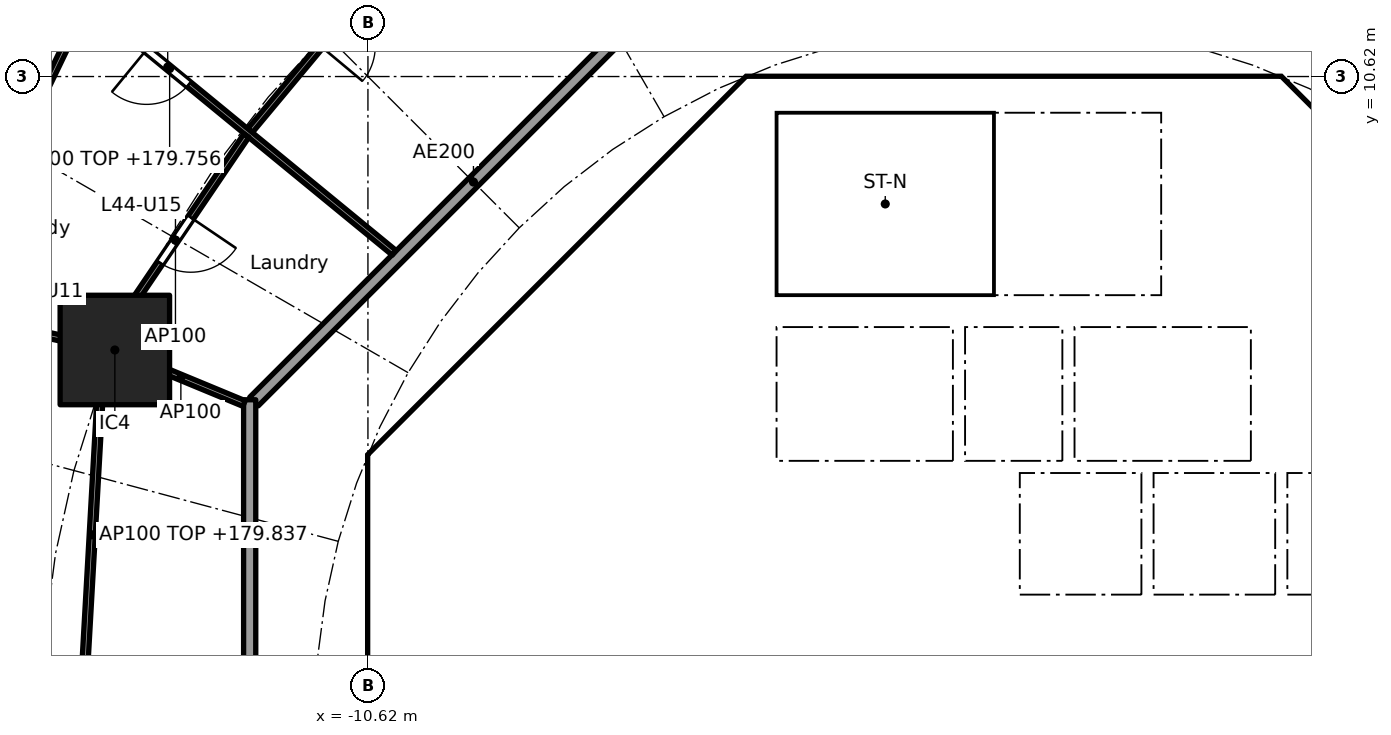
"""IFC4 building model, lengths in metres.
Left out: names, types, materials, properties, quantities, classifications, styles, units other than length and angle.
Written with IfcOpenShell. Run it as: python <this file> out.ifc"""

import sys

from ifc_helpers import new_model, si_unit, direction, frame, frame_2d, origin, origin_2d, place, context, subcontext, project, spatial, polyline, rectangle, outline, extrude, element, fill, save


model = new_model("IFC4")
c1 = context("Model", 3, precision=1e-05, world=origin(), true_north=direction((0.0, 1.0)))
c2 = subcontext(c1, "Body", "Model", "MODEL_VIEW")
j1 = project(units=[si_unit("LENGTHUNIT", "METRE"), si_unit("PLANEANGLEUNIT", "RADIAN")], contexts=[c1])
p1 = place(None, origin())
s1 = spatial("IfcSite", under=j1, at=p1, CompositionType="ELEMENT")
p2 = place(p1, origin())
s2 = spatial("IfcBuilding", under=s1, at=p2, CompositionType="ELEMENT")
p3 = place(p2, frame((0.0, 0.0, 177.0)))
s3 = spatial("IfcBuildingStorey", under=s2, at=p3, CompositionType="ELEMENT", Elevation=177.0)
p4 = place(p3, frame((-14.782, 6.123, 0.0), z_axis=(0.0, 0.0, 1.0), x_axis=(1.0, 0.0, 0.0)))
e1 = element("IfcColumn", 1, at=p4, inside=s3, PredefinedType="COLUMN", context=c2, shape_type="SweptSolid", body=[
    extrude(rectangle(XDim=1.8, YDim=1.8, at=origin_2d()), origin(), (0.0, 0.0, 1.0), 3.7),
])
p5 = place(p3, frame((9.988, 4.613, 0.0), z_axis=(0.0, 0.0, 1.0), x_axis=(-0.707106781187, 0.707106781187, 0.0)))
e2 = element("IfcWall", 2, at=p5, inside=s3, PredefinedType="SHEAR", context=c2, shape_type="SweptSolid", body=[
    extrude(rectangle(XDim=7.602, YDim=0.6, at=frame_2d((3.801, 0.0))), origin(), (0.0, 0.0, 1.0), 3.44),
])
p6 = place(p5, frame((3.201, 0.0, 0.0)))
e3 = element("IfcOpeningElement", 3, at=p6, cuts=e2, PredefinedType="OPENING", context=c2, shape_type="SweptSolid", body=[
    extrude(rectangle(XDim=1.2, YDim=2.1, at=frame_2d((0.6, 1.05))), frame((0.0, 0.31, 0.0), z_axis=(0.0, -1.0, 0.0), x_axis=(1.0, 0.0, 0.0)), (0.0, 0.0, 1.0), 0.62),
])
p7 = place(p3, frame((-4.613, 9.988, 0.0), z_axis=(0.0, 0.0, 1.0), x_axis=(-0.707106781187, -0.707106781187, 0.0)))
e4 = element("IfcWall", 4, at=p7, inside=s3, PredefinedType="SHEAR", context=c2, shape_type="SweptSolid", body=[
    extrude(rectangle(XDim=7.602, YDim=0.6, at=frame_2d((3.801, 0.0))), origin(), (0.0, 0.0, 1.0), 3.44),
])
p8 = place(p7, frame((0.351, 0.0, 0.0)))
e5 = element("IfcOpeningElement", 5, at=p8, cuts=e4, PredefinedType="OPENING", context=c2, shape_type="SweptSolid", body=[
    extrude(rectangle(XDim=1.1, YDim=2.1, at=frame_2d((0.55, 1.05))), frame((0.0, 0.31, 0.0), z_axis=(0.0, -1.0, 0.0), x_axis=(1.0, 0.0, 0.0)), (0.0, 0.0, 1.0), 0.62),
])
p9 = place(p3, frame((-10.325, 3.801, 0.0), z_axis=(0.0, 0.0, 1.0), x_axis=(0.0, -1.0, 0.0)))
e6 = element("IfcWall", 6, at=p9, inside=s3, PredefinedType="SHEAR", context=c2, shape_type="SweptSolid", body=[
    extrude(rectangle(XDim=7.602, YDim=0.6, at=frame_2d((3.801, 0.0))), origin(), (0.0, 0.0, 1.0), 3.44),
])
p10 = place(p9, frame((0.651, 0.0, 0.0)))
e7 = element("IfcOpeningElement", 7, at=p10, cuts=e6, PredefinedType="OPENING", context=c2, shape_type="SweptSolid", body=[
    extrude(rectangle(XDim=1.5, YDim=2.1, at=frame_2d((0.75, 1.05))), frame((0.0, 0.31, 0.0), z_axis=(0.0, -1.0, 0.0), x_axis=(1.0, 0.0, 0.0)), (0.0, 0.0, 1.0), 0.62),
])
p11 = place(p9, frame((5.451, 0.0, 0.0)))
e8 = element("IfcOpeningElement", 8, at=p11, cuts=e6, PredefinedType="OPENING", context=c2, shape_type="SweptSolid", body=[
    extrude(rectangle(XDim=1.5, YDim=2.1, at=frame_2d((0.75, 1.05))), frame((0.0, 0.31, 0.0), z_axis=(0.0, -1.0, 0.0), x_axis=(1.0, 0.0, 0.0)), (0.0, 0.0, 1.0), 0.62),
])
p12 = place(p3, frame((-5.8, 4.3, 0.0), z_axis=(0.0, 0.0, 1.0), x_axis=(0.0, 1.0, 0.0)))
e9 = element("IfcWall", 9, at=p12, inside=s3, PredefinedType="PARTITIONING", context=c2, shape_type="SweptSolid", body=[
    extrude(rectangle(XDim=3.927, YDim=0.15, at=frame_2d((1.963, 0.0))), origin(), (0.0, 0.0, 1.0), 3.44),
])
p13 = place(p12, frame((0.413, 0.0, 0.0)))
e10 = element("IfcOpeningElement", 10, at=p13, cuts=e9, PredefinedType="OPENING", context=c2, shape_type="SweptSolid", body=[
    extrude(rectangle(XDim=0.9, YDim=2.1, at=frame_2d((0.45, 1.05))), frame((0.0, 0.085, 0.0), z_axis=(0.0, -1.0, 0.0), x_axis=(1.0, 0.0, 0.0)), (0.0, 0.0, 1.0), 0.17),
])
p14 = place(p12, frame((2.489, 0.0, 0.0)))
e11 = element("IfcOpeningElement", 11, at=p14, cuts=e9, PredefinedType="OPENING", context=c2, shape_type="SweptSolid", body=[
    extrude(rectangle(XDim=0.9, YDim=2.1, at=frame_2d((0.45, 1.05))), frame((0.0, 0.085, 0.0), z_axis=(0.0, -1.0, 0.0), x_axis=(1.0, 0.0, 0.0)), (0.0, 0.0, 1.0), 0.17),
])
p15 = place(p3, frame((4.0, 4.3, 0.0), z_axis=(0.0, 0.0, 1.0), x_axis=(0.0, 1.0, 0.0)))
e12 = element("IfcWall", 12, at=p15, inside=s3, PredefinedType="SOLIDWALL", context=c2, shape_type="SweptSolid", body=[
    extrude(rectangle(XDim=2.2, YDim=0.2, at=frame_2d((1.1, 0.0))), origin(), (0.0, 0.0, 1.0), 3.44),
])
p16 = place(p15, frame((0.55, 0.0, 0.0)))
e13 = element("IfcOpeningElement", 13, at=p16, cuts=e12, PredefinedType="OPENING", context=c2, shape_type="SweptSolid", body=[
    extrude(rectangle(XDim=1.1, YDim=2.1, at=frame_2d((0.55, 1.05))), frame((0.0, 0.11, 0.0), z_axis=(0.0, -1.0, 0.0), x_axis=(1.0, 0.0, 0.0)), (0.0, 0.0, 1.0), 0.22),
])
p17 = place(p3, frame((-4.0, 4.3, 0.0), z_axis=(0.0, 0.0, 1.0), x_axis=(0.0, 1.0, 0.0)))
e14 = element("IfcWall", 14, at=p17, inside=s3, PredefinedType="SOLIDWALL", context=c2, shape_type="SweptSolid", body=[
    extrude(rectangle(XDim=2.2, YDim=0.2, at=frame_2d((1.1, 0.0))), origin(), (0.0, 0.0, 1.0), 3.44),
])
p18 = place(p17, frame((0.55, 0.0, 0.0)))
e15 = element("IfcOpeningElement", 15, at=p18, cuts=e14, PredefinedType="OPENING", context=c2, shape_type="SweptSolid", body=[
    extrude(rectangle(XDim=1.1, YDim=2.1, at=frame_2d((0.55, 1.05))), frame((0.0, 0.11, 0.0), z_axis=(0.0, -1.0, 0.0), x_axis=(1.0, 0.0, 0.0)), (0.0, 0.0, 1.0), 0.22),
])
p19 = place(p3, frame((-6.7, 2.0, 0.0), z_axis=(0.0, 0.0, 1.0), x_axis=(1.0, 0.0, 0.0)))
e16 = element("IfcWall", 16, at=p19, inside=s3, PredefinedType="SOLIDWALL", context=c2, shape_type="SweptSolid", body=[
    extrude(rectangle(XDim=13.4, YDim=0.2, at=frame_2d((6.7, 0.0))), origin(), (0.0, 0.0, 1.0), 3.44),
])
p20 = place(p19, frame((7.25, 0.0, 0.0)))
e17 = element("IfcOpeningElement", 17, at=p20, cuts=e16, PredefinedType="OPENING", context=c2, shape_type="SweptSolid", body=[
    extrude(rectangle(XDim=1.1, YDim=2.1, at=frame_2d((0.55, 1.05))), frame((0.0, 0.11, 0.0), z_axis=(0.0, -1.0, 0.0), x_axis=(1.0, 0.0, 0.0)), (0.0, 0.0, 1.0), 0.22),
])
p21 = place(p19, frame((9.45, 0.0, 0.0)))
e18 = element("IfcOpeningElement", 18, at=p21, cuts=e16, PredefinedType="OPENING", context=c2, shape_type="SweptSolid", body=[
    extrude(rectangle(XDim=1.1, YDim=2.1, at=frame_2d((0.55, 1.05))), frame((0.0, 0.11, 0.0), z_axis=(0.0, -1.0, 0.0), x_axis=(1.0, 0.0, 0.0)), (0.0, 0.0, 1.0), 0.22),
])
p22 = place(p19, frame((0.75, 0.0, 0.0)))
e19 = element("IfcOpeningElement", 19, at=p22, cuts=e16, PredefinedType="OPENING", context=c2, shape_type="SweptSolid", body=[
    extrude(rectangle(XDim=0.9, YDim=2.1, at=frame_2d((0.45, 1.05))), frame((0.0, 0.11, 0.0), z_axis=(0.0, -1.0, 0.0), x_axis=(1.0, 0.0, 0.0)), (0.0, 0.0, 1.0), 0.22),
])
p23 = place(p19, frame((4.05, 0.0, 0.0)))
e20 = element("IfcOpeningElement", 20, at=p23, cuts=e16, PredefinedType="OPENING", context=c2, shape_type="SweptSolid", body=[
    extrude(rectangle(XDim=0.9, YDim=2.1, at=frame_2d((0.45, 1.05))), frame((0.0, 0.11, 0.0), z_axis=(0.0, -1.0, 0.0), x_axis=(1.0, 0.0, 0.0)), (0.0, 0.0, 1.0), 0.22),
])
p24 = place(p3, frame((4.0, 7.025, 0.0), z_axis=(0.0, 0.0, 1.0), x_axis=(0.0, 1.0, 0.0)))
e21 = element("IfcWall", 21, at=p24, inside=s3, PredefinedType="SOLIDWALL", context=c2, shape_type="SweptSolid", body=[
    extrude(rectangle(XDim=3.0, YDim=0.2, at=frame_2d((1.5, 0.0))), origin(), (0.0, 0.0, 1.0), 3.44),
])
p25 = place(p24, frame((0.925, 0.0, 0.0)))
e22 = element("IfcOpeningElement", 22, at=p25, cuts=e21, PredefinedType="OPENING", context=c2, shape_type="SweptSolid", body=[
    extrude(rectangle(XDim=1.1, YDim=2.1, at=frame_2d((0.55, 1.05))), frame((0.0, 0.11, 0.0), z_axis=(0.0, -1.0, 0.0), x_axis=(1.0, 0.0, 0.0)), (0.0, 0.0, 1.0), 0.22),
])
p26 = place(p3, origin())
e23 = element("IfcWall", 23, at=p26, inside=s3, PredefinedType="SHEAR", context=c2, shape_type="SweptSolid", body=[
    extrude(outline(polyline([(-10.2, 4.825), (-9.776, 4.401), (-10.025, 4.152), (-10.025, 3.801), (-10.625, 3.801), (-10.625, 4.401), (-10.2, 4.825)])), origin(), (0.0, 0.0, 1.0), 3.44),
])
p27 = place(p3, origin())
e24 = element("IfcWall", 24, at=p27, inside=s3, PredefinedType="SHEAR", context=c2, shape_type="SweptSolid", body=[
    extrude(outline(polyline([(-4.152, 10.025), (-4.401, 9.776), (-4.825, 10.2), (-4.401, 10.625), (4.401, 10.625), (4.825, 10.2), (4.401, 9.776), (4.152, 10.025), (-4.152, 10.025)])), origin(), (0.0, 0.0, 1.0), 3.44),
])
p28 = place(p3, frame((-10.025, 4.0, 0.0), z_axis=(0.0, 0.0, 1.0), x_axis=(1.0, 0.0, 0.0)))
e25 = element("IfcWall", 25, at=p28, inside=s3, PredefinedType="PARTITIONING", context=c2, shape_type="SweptSolid", body=[
    extrude(rectangle(XDim=3.325, YDim=0.2, at=frame_2d((1.662, 0.0))), origin(), (0.0, 0.0, 1.0), 3.44),
])
p29 = place(p3, frame((-8.001, 6.1, 0.0), z_axis=(0.0, 0.0, 1.0), x_axis=(1.0, 0.0, 0.0)))
e26 = element("IfcWall", 26, at=p29, inside=s3, PredefinedType="PARTITIONING", context=c2, shape_type="SweptSolid", body=[
    extrude(rectangle(XDim=2.126, YDim=0.15, at=frame_2d((1.063, 0.0))), origin(), (0.0, 0.0, 1.0), 3.44),
])
for number, where, z_axis, x_axis in (
    (27, (-0.9, 4.3, 0.0), (0.0, 0.0, 1.0), (0.0, 1.0, 0.0)),
    (28, (0.9, 4.3, 0.0), (0.0, 0.0, 1.0), (0.0, 1.0, 0.0)),
):
    element("IfcWall", number, at=place(p3, frame(where, z_axis=z_axis, x_axis=x_axis)), inside=s3, PredefinedType="SOLIDWALL", context=c2, shape_type="SweptSolid", body=[
        extrude(rectangle(XDim=2.2, YDim=0.2, at=frame_2d((1.1, 0.0))), origin(), (0.0, 0.0, 1.0), 3.44),
    ])
p30 = place(p3, origin())
e29 = element("IfcWall", 29, at=p30, inside=s3, PredefinedType="SOLIDWALL", context=c2, shape_type="SweptSolid", body=[
    extrude(outline(polyline([(-6.7, 4.3), (6.7, 4.3), (6.7, 2.1), (6.5, 2.1), (6.5, 4.1), (4.5, 4.1), (4.5, 2.1), (4.3, 2.1), (4.3, 4.1), (2.3, 4.1), (2.3, 2.1), (2.1, 2.1), (2.1, 4.1), (0.1, 4.1), (0.1, 2.1), (-0.1, 2.1), (-0.1, 4.1), (-4.3, 4.1), (-4.3, 2.1), (-4.5, 2.1), (-4.5, 4.1), (-6.5, 4.1), (-6.5, 2.1), (-6.7, 2.1), (-6.7, 4.3)])), origin(), (0.0, 0.0, 1.0), 3.44),
])
p31 = place(p3, origin())
e30 = element("IfcWall", 30, at=p31, inside=s3, PredefinedType="SOLIDWALL", context=c2, shape_type="SweptSolid", body=[
    extrude(outline(polyline([(-3.9, 7.025), (-4.1, 7.025), (-4.1, 10.025), (-3.9, 10.025), (-3.9, 7.025)])), origin(), (0.0, 0.0, 1.0), 3.44),
])
p32 = place(p3, origin())
e31 = element("IfcWall", 31, at=p32, inside=s3, PredefinedType="SOLIDWALL", context=c2, shape_type="SweptSolid", body=[
    extrude(outline(polyline([(4.1, 6.5), (-4.1, 6.5), (-4.1, 7.025), (4.1, 7.025), (4.1, 6.5)])), origin(), (0.0, 0.0, 1.0), 3.44),
])
p33 = place(p3, frame((-5.275, 12.494, 0.0), z_axis=(0.0, 0.0, 1.0), x_axis=(-0.707106781187, -0.707106781187, 0.0)))
e32 = element("IfcWall", 32, at=p33, inside=s3, PredefinedType="PARTITIONING", context=c2, shape_type="SweptSolid", body=[
    extrude(rectangle(XDim=10.209, YDim=0.2, at=frame_2d((5.104, 0.0))), origin(), (0.0, 0.0, 1.0), 3.44),
])
p34 = place(p3, frame((-12.565, 5.304, 0.0), z_axis=(0.0, 0.0, 1.0), x_axis=(0.0, -1.0, 0.0)))
e33 = element("IfcWall", 33, at=p34, inside=s3, PredefinedType="PARTITIONING", context=c2, shape_type="SweptSolid", body=[
    extrude(rectangle(XDim=10.409, YDim=0.2, at=frame_2d((5.205, 0.0))), origin(), (0.0, 0.0, 1.0), 3.44),
])
p35 = place(p3, frame((-9.631, 13.242, 0.0), z_axis=(0.0, 0.0, 1.0), x_axis=(-0.640315711982, -0.768111833647, 0.0)))
e34 = element("IfcWall", 34, at=p35, inside=s3, PredefinedType="PARTITIONING", context=c2, shape_type="SweptSolid", body=[
    extrude(rectangle(XDim=4.572, YDim=0.1, at=frame_2d((2.286, 0.0))), origin(), (0.0, 0.0, 1.0), 2.837),
])
p36 = place(p35, frame((1.861, 0.0, 0.0)))
e35 = element("IfcOpeningElement", 35, at=p36, cuts=e34, PredefinedType="OPENING", context=c2, shape_type="SweptSolid", body=[
    extrude(rectangle(XDim=0.9, YDim=2.1, at=frame_2d((0.45, 1.05))), frame((0.0, 0.06, 0.0), z_axis=(0.0, -1.0, 0.0), x_axis=(1.0, 0.0, 0.0)), (0.0, 0.0, 1.0), 0.12),
])
p37 = place(p3, frame((-10.189, 7.721, 0.0), z_axis=(0.0, 0.0, 1.0), x_axis=(-0.773134429339, 0.634242188892, 0.0)))
e36 = element("IfcWall", 36, at=p37, inside=s3, PredefinedType="PARTITIONING", context=c2, shape_type="SweptSolid", body=[
    extrude(rectangle(XDim=9.552, YDim=0.1, at=frame_2d((4.776, 0.0))), origin(), (0.0, 0.0, 1.0), 2.756),
])
p38 = place(p37, frame((4.367, 0.0, 0.0)))
e37 = element("IfcOpeningElement", 37, at=p38, cuts=e36, PredefinedType="OPENING", context=c2, shape_type="SweptSolid", body=[
    extrude(rectangle(XDim=0.9, YDim=2.1, at=frame_2d((0.45, 1.05))), frame((0.0, 0.06, 0.0), z_axis=(0.0, -1.0, 0.0), x_axis=(1.0, 0.0, 0.0)), (0.0, 0.0, 1.0), 0.12),
])
p39 = place(p3, frame((-12.619, 9.65, 0.0), z_axis=(0.0, 0.0, 1.0), x_axis=(-0.561064907171, -0.827771810308, 0.0)))
e38 = element("IfcWall", 38, at=p39, inside=s3, PredefinedType="PARTITIONING", context=c2, shape_type="SweptSolid", body=[
    extrude(rectangle(XDim=4.159, YDim=0.1, at=frame_2d((2.079, 0.0))), origin(), (0.0, 0.0, 1.0), 3.44),
])
p40 = place(p39, frame((1.629, 0.0, 0.0)))
e39 = element("IfcOpeningElement", 39, at=p40, cuts=e38, PredefinedType="OPENING", context=c2, shape_type="SweptSolid", body=[
    extrude(rectangle(XDim=0.9, YDim=2.1, at=frame_2d((0.45, 1.05))), frame((0.0, 0.06, 0.0), z_axis=(0.0, -1.0, 0.0), x_axis=(1.0, 0.0, 0.0)), (0.0, 0.0, 1.0), 0.12),
])
p41 = place(p3, frame((-15.257, 11.816, 0.0), z_axis=(0.0, 0.0, 1.0), x_axis=(-0.434040130629, -0.900893536997, 0.0)))
e40 = element("IfcWall", 40, at=p41, inside=s3, PredefinedType="PARTITIONING", context=c2, shape_type="SweptSolid", body=[
    extrude(rectangle(XDim=5.558, YDim=0.1, at=frame_2d((2.779, 0.0))), origin(), (0.0, 0.0, 1.0), 3.44),
])
p42 = place(p3, frame((-12.657, 5.243, 0.0), z_axis=(0.0, 0.0, 1.0), x_axis=(-0.923848837015, 0.382757529444, 0.0)))
e41 = element("IfcWall", 41, at=p42, inside=s3, PredefinedType="PARTITIONING", context=c2, shape_type="SweptSolid", body=[
    extrude(rectangle(XDim=2.25, YDim=0.1, at=frame_2d((1.125, 0.0))), origin(), (0.0, 0.0, 1.0), 3.44),
])
p43 = place(p3, frame((-14.831, 6.134, 0.0), z_axis=(0.0, 0.0, 1.0), x_axis=(-0.976560749847, 0.215241961191, 0.0)))
e42 = element("IfcWall", 42, at=p43, inside=s3, PredefinedType="PARTITIONING", context=c2, shape_type="SweptSolid", body=[
    extrude(rectangle(XDim=2.879, YDim=0.1, at=frame_2d((1.439, 0.0))), origin(), (0.0, 0.0, 1.0), 3.44),
])
p44 = place(p43, frame((1.291, 0.0, 0.0)))
e43 = element("IfcOpeningElement", 43, at=p44, cuts=e42, PredefinedType="OPENING", context=c2, shape_type="SweptSolid", body=[
    extrude(rectangle(XDim=0.9, YDim=2.1, at=frame_2d((0.45, 1.05))), frame((0.0, 0.06, 0.0), z_axis=(0.0, -1.0, 0.0), x_axis=(1.0, 0.0, 0.0)), (0.0, 0.0, 1.0), 0.12),
])
p45 = place(p3, frame((-14.983, 6.117, 0.0), z_axis=(0.0, 0.0, 1.0), x_axis=(-0.056328933432, -0.998412265178, 0.0)))
e44 = element("IfcWall", 44, at=p45, inside=s3, PredefinedType="PARTITIONING", context=c2, shape_type="SweptSolid", body=[
    extrude(rectangle(XDim=6.077, YDim=0.1, at=frame_2d((3.038, 0.0))), origin(), (0.0, 0.0, 1.0), 2.837),
])
p46 = place(p20, origin())
e45 = element("IfcDoor", 45, at=p46, inside=s3, OperationType="DOUBLE_DOOR_SLIDING", PredefinedType="DOOR", context=c2, shape_type="SweptSolid", body=[
    extrude(rectangle(XDim=1.1, YDim=2.1, at=frame_2d((0.55, 1.05))), frame((0.0, 0.025, 0.0), z_axis=(0.0, -1.0, 0.0), x_axis=(1.0, 0.0, 0.0)), (0.0, 0.0, 1.0), 0.05),
])
fill(e17, e45)
p47 = place(p21, origin())
e46 = element("IfcDoor", 46, at=p47, inside=s3, OperationType="DOUBLE_DOOR_SLIDING", PredefinedType="DOOR", context=c2, shape_type="SweptSolid", body=[
    extrude(rectangle(XDim=1.1, YDim=2.1, at=frame_2d((0.55, 1.05))), frame((0.0, 0.025, 0.0), z_axis=(0.0, -1.0, 0.0), x_axis=(1.0, 0.0, 0.0)), (0.0, 0.0, 1.0), 0.05),
])
fill(e18, e46)
p48 = place(p16, origin())
e47 = element("IfcDoor", 47, at=p48, inside=s3, OperationType="DOUBLE_DOOR_SLIDING", PredefinedType="DOOR", context=c2, shape_type="SweptSolid", body=[
    extrude(rectangle(XDim=1.1, YDim=2.1, at=frame_2d((0.55, 1.05))), frame((0.0, 0.025, 0.0), z_axis=(0.0, -1.0, 0.0), x_axis=(1.0, 0.0, 0.0)), (0.0, 0.0, 1.0), 0.05),
])
fill(e13, e47)
p49 = place(p18, origin())
e48 = element("IfcDoor", 48, at=p49, inside=s3, OperationType="DOUBLE_DOOR_SLIDING", PredefinedType="DOOR", context=c2, shape_type="SweptSolid", body=[
    extrude(rectangle(XDim=1.1, YDim=2.1, at=frame_2d((0.55, 1.05))), frame((0.0, 0.025, 0.0), z_axis=(0.0, -1.0, 0.0), x_axis=(1.0, 0.0, 0.0)), (0.0, 0.0, 1.0), 0.05),
])
fill(e15, e48)
p50 = place(p25, origin())
e49 = element("IfcDoor", 49, at=p50, inside=s3, OperationType="SINGLE_SWING_RIGHT", PredefinedType="DOOR", context=c2, shape_type="SweptSolid", body=[
    extrude(rectangle(XDim=1.1, YDim=2.1, at=frame_2d((0.55, 1.05))), frame((0.0, 0.025, 0.0), z_axis=(0.0, -1.0, 0.0), x_axis=(1.0, 0.0, 0.0)), (0.0, 0.0, 1.0), 0.05),
])
fill(e22, e49)
p51 = place(p13, origin())
e50 = element("IfcDoor", 50, at=p51, inside=s3, OperationType="SINGLE_SWING_LEFT", PredefinedType="DOOR", context=c2, shape_type="SweptSolid", body=[
    extrude(rectangle(XDim=0.9, YDim=2.1, at=frame_2d((0.45, 1.05))), frame((0.0, 0.025, 0.0), z_axis=(0.0, -1.0, 0.0), x_axis=(1.0, 0.0, 0.0)), (0.0, 0.0, 1.0), 0.05),
])
fill(e10, e50)
p52 = place(p14, origin())
e51 = element("IfcDoor", 51, at=p52, inside=s3, OperationType="SINGLE_SWING_LEFT", PredefinedType="DOOR", context=c2, shape_type="SweptSolid", body=[
    extrude(rectangle(XDim=0.9, YDim=2.1, at=frame_2d((0.45, 1.05))), frame((0.0, 0.025, 0.0), z_axis=(0.0, -1.0, 0.0), x_axis=(1.0, 0.0, 0.0)), (0.0, 0.0, 1.0), 0.05),
])
fill(e11, e51)
p53 = place(p22, origin())
e52 = element("IfcDoor", 52, at=p53, inside=s3, OperationType="SINGLE_SWING_RIGHT", PredefinedType="DOOR", context=c2, shape_type="SweptSolid", body=[
    extrude(rectangle(XDim=0.9, YDim=2.1, at=frame_2d((0.45, 1.05))), frame((0.0, 0.025, 0.0), z_axis=(0.0, -1.0, 0.0), x_axis=(1.0, 0.0, 0.0)), (0.0, 0.0, 1.0), 0.05),
])
fill(e19, e52)
p54 = place(p23, origin())
e53 = element("IfcDoor", 53, at=p54, inside=s3, OperationType="SINGLE_SWING_RIGHT", PredefinedType="DOOR", context=c2, shape_type="SweptSolid", body=[
    extrude(rectangle(XDim=0.9, YDim=2.1, at=frame_2d((0.45, 1.05))), frame((0.0, 0.025, 0.0), z_axis=(0.0, -1.0, 0.0), x_axis=(1.0, 0.0, 0.0)), (0.0, 0.0, 1.0), 0.05),
])
fill(e20, e53)
p55 = place(p10, origin())
e54 = element("IfcDoor", 54, at=p55, inside=s3, OperationType="DOUBLE_DOOR_SINGLE_SWING", PredefinedType="DOOR", context=c2, shape_type="SweptSolid", body=[
    extrude(rectangle(XDim=1.5, YDim=2.1, at=frame_2d((0.75, 1.05))), frame((0.0, 0.025, 0.0), z_axis=(0.0, -1.0, 0.0), x_axis=(1.0, 0.0, 0.0)), (0.0, 0.0, 1.0), 0.05),
])
fill(e7, e54)
p56 = place(p8, origin())
e55 = element("IfcDoor", 55, at=p56, inside=s3, OperationType="SINGLE_SWING_LEFT", PredefinedType="DOOR", context=c2, shape_type="SweptSolid", body=[
    extrude(rectangle(XDim=1.1, YDim=2.1, at=frame_2d((0.55, 1.05))), frame((0.0, 0.025, 0.0), z_axis=(0.0, -1.0, 0.0), x_axis=(1.0, 0.0, 0.0)), (0.0, 0.0, 1.0), 0.05),
])
fill(e5, e55)
p57 = place(p38, origin())
e56 = element("IfcDoor", 56, at=p57, inside=s3, OperationType="SINGLE_SWING_RIGHT", PredefinedType="DOOR", context=c2, shape_type="SweptSolid", body=[
    extrude(rectangle(XDim=0.9, YDim=2.1, at=frame_2d((0.45, 1.05))), frame((0.0, 0.025, 0.0), z_axis=(0.0, -1.0, 0.0), x_axis=(1.0, 0.0, 0.0)), (0.0, 0.0, 1.0), 0.05),
])
fill(e37, e56)
p58 = place(p40, origin())
e57 = element("IfcDoor", 57, at=p58, inside=s3, OperationType="SINGLE_SWING_LEFT", PredefinedType="DOOR", context=c2, shape_type="SweptSolid", body=[
    extrude(rectangle(XDim=0.9, YDim=2.1, at=frame_2d((0.45, 1.05))), frame((0.0, 0.025, 0.0), z_axis=(0.0, -1.0, 0.0), x_axis=(1.0, 0.0, 0.0)), (0.0, 0.0, 1.0), 0.05),
])
fill(e39, e57)
save(model, sys.argv[1])
